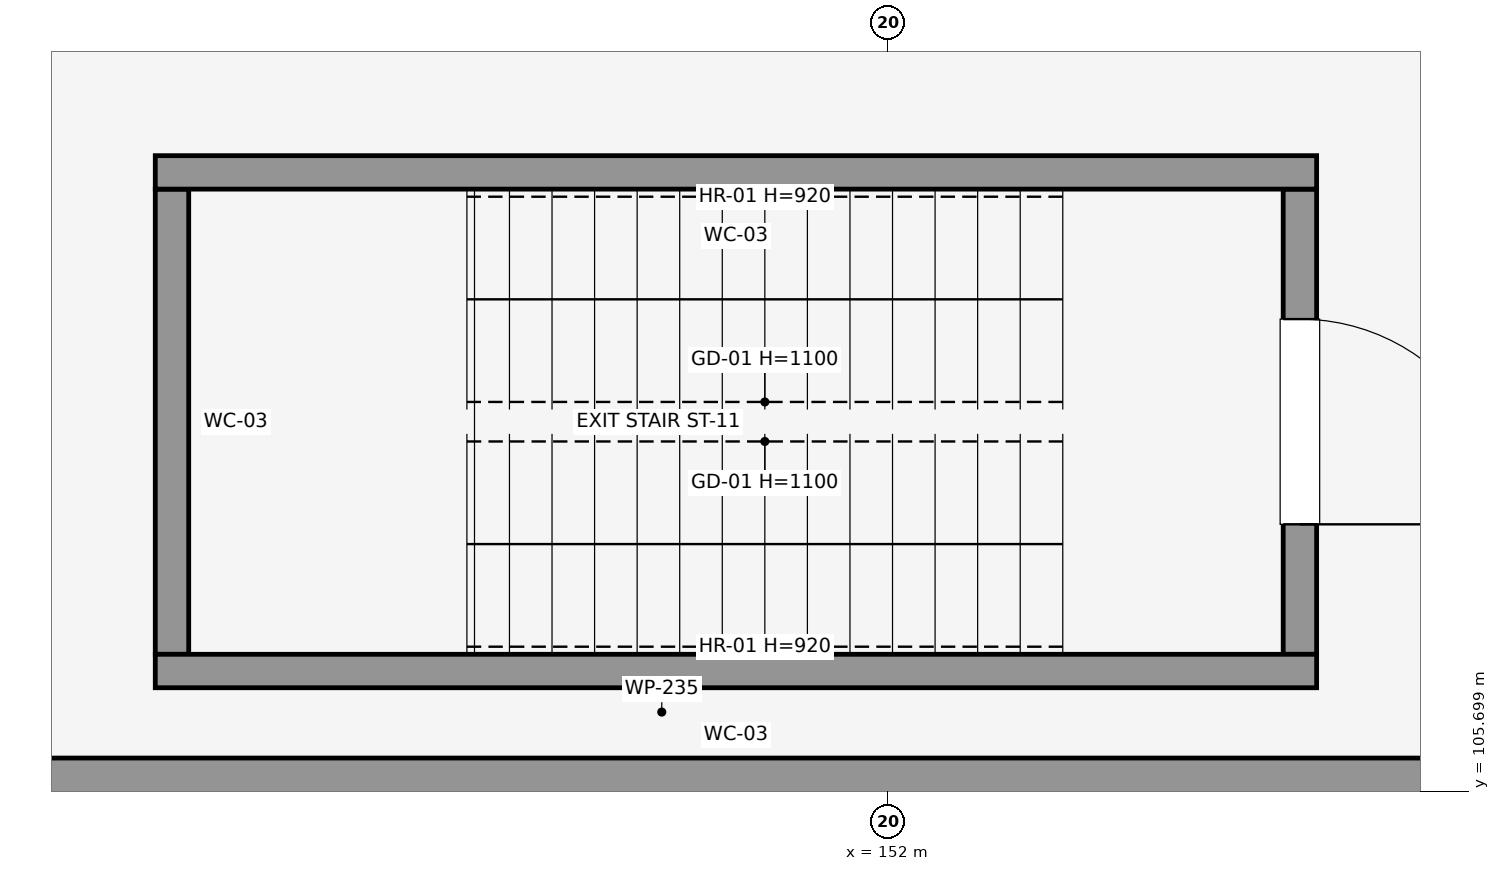
"""IFC4 building model, lengths in metres.
Left out: names, types, materials, properties, quantities, classifications, styles, units other than length and angle.
Written with IfcOpenShell. Run it as: python <this file> out.ifc"""

import sys

from ifc_helpers import new_model, si_unit, direction, frame, frame_2d, origin, place, context, subcontext, project, spatial, rectangle, extrude, element, fill, save


model = new_model("IFC4")
c1 = context("Model", 3, precision=1e-05, world=origin(), true_north=direction((0.0, 1.0)))
c2 = subcontext(c1, "Body", "Model", "MODEL_VIEW")
j1 = project(units=[si_unit("LENGTHUNIT", "METRE"), si_unit("PLANEANGLEUNIT", "RADIAN")], contexts=[c1])
p1 = place(None, origin())
s1 = spatial("IfcSite", under=j1, at=p1, CompositionType="ELEMENT")
p2 = place(p1, origin())
s2 = spatial("IfcBuilding", under=s1, at=p2, CompositionType="ELEMENT")
p3 = place(p2, frame((0.0, 0.0, 4.5)))
s3 = spatial("IfcBuildingStorey", under=s2, at=p3, CompositionType="ELEMENT", Elevation=4.5)
p4 = place(p3, frame((154.71, 109.66, 0.0), z_axis=(0.0, 0.0, 1.0), x_axis=(0.0, -1.0, 0.0)))
e1 = element("IfcWall", 1, at=p4, inside=s3, PredefinedType="SHEAR", context=c2, shape_type="SweptSolid", body=[
    extrude(rectangle(XDim=3.06, YDim=0.22, at=frame_2d((1.53, 0.0))), origin(), (0.0, 0.0, 1.0), 4.5),
])
p5 = place(p4, frame((0.855, 0.0, 0.0)))
e2 = element("IfcOpeningElement", 2, at=p5, cuts=e1, PredefinedType="OPENING", context=c2, shape_type="SweptSolid", body=[
    extrude(rectangle(XDim=1.35, YDim=2.15, at=frame_2d((0.675, 1.075))), frame((0.0, 0.12, 0.0), z_axis=(0.0, -1.0, 0.0), x_axis=(1.0, 0.0, 0.0)), (0.0, 0.0, 1.0), 0.24),
])
p6 = place(p3, frame((147.29, 109.66, 0.0), z_axis=(0.0, 0.0, 1.0), x_axis=(0.0, -1.0, 0.0)))
e3 = element("IfcWall", 3, at=p6, inside=s3, PredefinedType="SHEAR", context=c2, shape_type="SweptSolid", body=[
    extrude(rectangle(XDim=3.06, YDim=0.22, at=frame_2d((1.53, 0.0))), origin(), (0.0, 0.0, 1.0), 4.5),
])
for number, where, z_axis, x_axis in (
    (4, (154.82, 109.77, 0.0), (0.0, 0.0, 1.0), (-1.0, 0.0, 0.0)),
    (5, (154.82, 106.49, 0.0), (0.0, 0.0, 1.0), (-1.0, 0.0, 0.0)),
):
    element("IfcWall", number, at=place(p3, frame(where, z_axis=z_axis, x_axis=x_axis)), inside=s3, PredefinedType="SHEAR", context=c2, shape_type="SweptSolid", body=[
        extrude(rectangle(XDim=7.64, YDim=0.22, at=frame_2d((3.82, 0.0))), origin(), (0.0, 0.0, 1.0), 4.5),
    ])
p7 = place(p3, frame((144.146, 105.8, 0.0), z_axis=(0.0, 0.0, 1.0), x_axis=(1.0, 0.0, 0.0)))
e6 = element("IfcWall", 6, at=p7, inside=s3, PredefinedType="PARTITIONING", context=c2, shape_type="SweptSolid", body=[
    extrude(rectangle(XDim=12.732, YDim=0.235, at=frame_2d((6.366, 0.0))), origin(), (0.0, 0.0, 1.0), 2.7),
])
p8 = place(p5, origin())
e7 = element("IfcDoor", 7, at=p8, inside=s3, OperationType="SINGLE_SWING_RIGHT", PredefinedType="DOOR", context=c2, shape_type="SweptSolid", body=[
    extrude(rectangle(XDim=1.35, YDim=2.15, at=frame_2d((0.675, 1.075))), frame((0.0, 0.025, 0.0), z_axis=(0.0, -1.0, 0.0), x_axis=(1.0, 0.0, 0.0)), (0.0, 0.0, 1.0), 0.05),
])
fill(e2, e7)
save(model, sys.argv[1])
